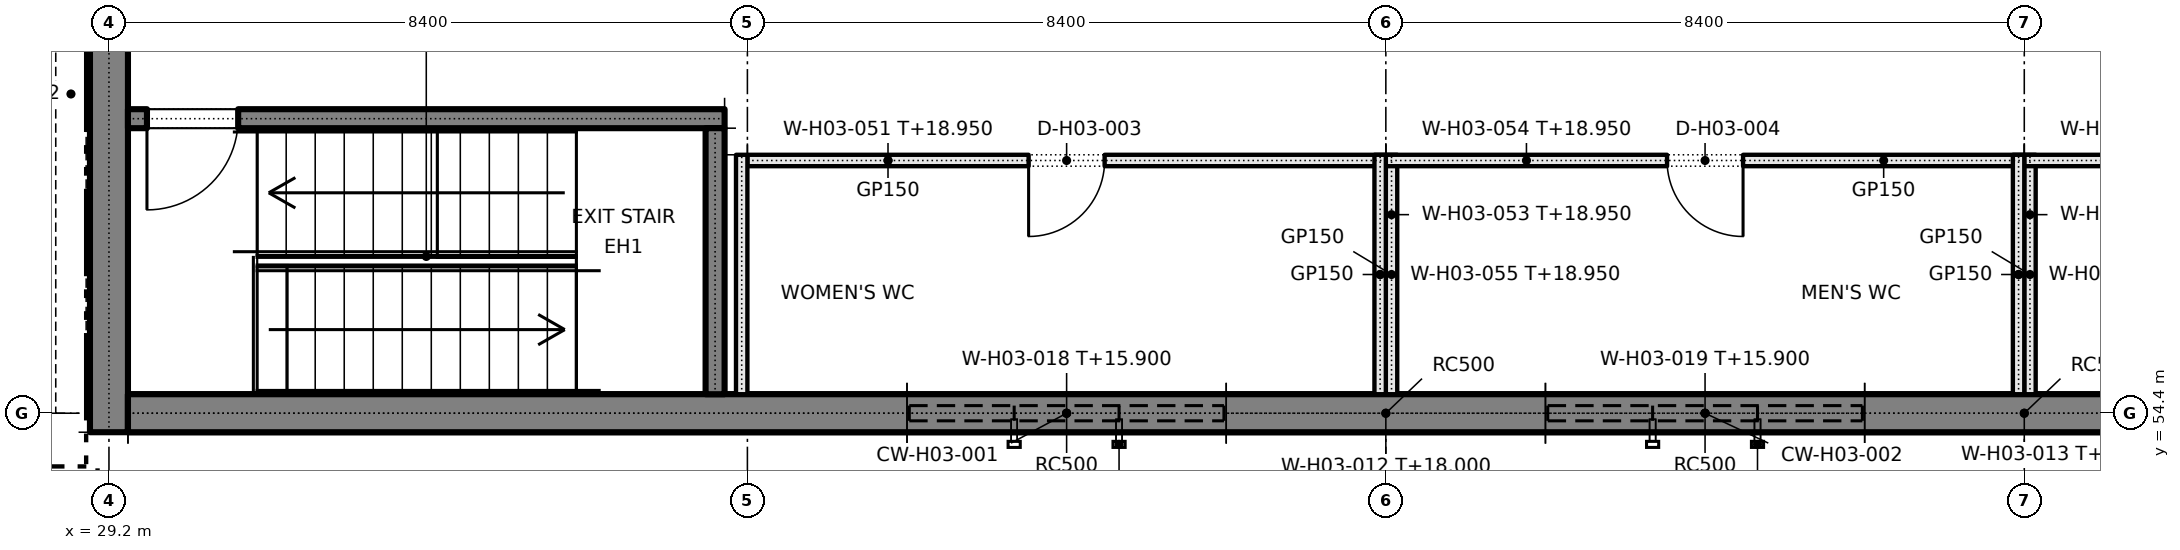
"""IFC4 building model, lengths in metres.
Left out: names, types, materials, properties, quantities, classifications, styles, units other than length and angle.
Written with IfcOpenShell. Run it as: python <this file> out.ifc"""

import sys

from ifc_helpers import new_model, si_unit, direction, frame, frame_2d, origin, place, context, subcontext, project, spatial, rectangle, extrude, element, fill, save


model = new_model("IFC4")
c1 = context("Model", 3, precision=1e-05, world=origin(), true_north=direction((0.0, 1.0)))
c2 = subcontext(c1, "Body", "Model", "MODEL_VIEW")
j1 = project(units=[si_unit("LENGTHUNIT", "METRE"), si_unit("PLANEANGLEUNIT", "RADIAN")], contexts=[c1])
p1 = place(None, origin())
s1 = spatial("IfcSite", under=j1, at=p1, CompositionType="ELEMENT")
p2 = place(p1, origin())
s2 = spatial("IfcBuilding", under=s1, at=p2, CompositionType="ELEMENT")
p3 = place(p2, frame((0.0, 0.0, 15.0)))
s3 = spatial("IfcBuildingStorey", under=s2, at=p3, CompositionType="ELEMENT", Elevation=15.0)
p4 = place(p3, frame((29.2, 54.15, 0.0), z_axis=(0.0, 0.0, 1.0), x_axis=(0.0, 1.0, 0.0)))
e1 = element("IfcWall", 1, at=p4, inside=s3, PredefinedType="SOLIDWALL", context=c2, shape_type="SweptSolid", body=[
    extrude(rectangle(XDim=42.5, YDim=0.5, at=frame_2d((21.25, 0.0))), origin(), (0.0, 0.0, 1.0), 4.2),
])
p5 = place(p3, frame((29.45, 54.4, 0.0), z_axis=(0.0, 0.0, 1.0), x_axis=(1.0, 0.0, 0.0)))
e2 = element("IfcWall", 2, at=p5, inside=s3, PredefinedType="SOLIDWALL", context=c2, shape_type="SweptSolid", body=[
    extrude(rectangle(XDim=10.25, YDim=0.5, at=frame_2d((5.125, 0.0))), origin(), (0.0, 0.0, 1.0), 3.0),
])
p6 = place(p3, frame((43.9, 54.4, 0.0), z_axis=(0.0, 0.0, 1.0), x_axis=(1.0, 0.0, 0.0)))
e3 = element("IfcWall", 3, at=p6, inside=s3, PredefinedType="SOLIDWALL", context=c2, shape_type="SweptSolid", body=[
    extrude(rectangle(XDim=4.2, YDim=0.5, at=frame_2d((2.1, 0.0))), origin(), (0.0, 0.0, 1.0), 3.0),
])
p7 = place(p3, frame((52.3, 54.4, 0.0), z_axis=(0.0, 0.0, 1.0), x_axis=(1.0, 0.0, 0.0)))
e4 = element("IfcWall", 4, at=p7, inside=s3, PredefinedType="SOLIDWALL", context=c2, shape_type="SweptSolid", body=[
    extrude(rectangle(XDim=4.2, YDim=0.5, at=frame_2d((2.1, 0.0))), origin(), (0.0, 0.0, 1.0), 3.0),
])
for number, where, z_axis, x_axis in (
    (5, (39.7, 54.4, 0.0), (0.0, 0.0, 1.0), (1.0, 0.0, 0.0)),
    (6, (48.1, 54.4, 0.0), (0.0, 0.0, 1.0), (1.0, 0.0, 0.0)),
):
    element("IfcWall", number, at=place(p3, frame(where, z_axis=z_axis, x_axis=x_axis)), inside=s3, PredefinedType="SOLIDWALL", context=c2, shape_type="SweptSolid", body=[
        extrude(rectangle(XDim=4.2, YDim=0.5, at=frame_2d((2.1, 0.0))), origin(), (0.0, 0.0, 1.0), 0.9),
    ])
p8 = place(p3, frame((29.45, 54.4, 3.0), z_axis=(0.0, 0.0, 1.0), x_axis=(1.0, 0.0, 0.0)))
e7 = element("IfcWall", 7, at=p8, inside=s3, PredefinedType="SOLIDWALL", context=c2, shape_type="SweptSolid", body=[
    extrude(rectangle(XDim=66.7, YDim=0.5, at=frame_2d((33.35, 0.0))), origin(), (0.0, 0.0, 1.0), 1.2),
])
p9 = place(p3, frame((29.45, 58.275, 0.0), z_axis=(0.0, 0.0, 1.0), x_axis=(1.0, 0.0, 0.0)))
e8 = element("IfcWall", 8, at=p9, inside=s3, PredefinedType="SOLIDWALL", context=c2, shape_type="SweptSolid", body=[
    extrude(rectangle(XDim=7.85, YDim=0.25, at=frame_2d((3.925, 0.0))), origin(), (0.0, 0.0, 1.0), 4.2),
])
p10 = place(p9, frame((0.25, 0.0, 0.0)))
e9 = element("IfcOpeningElement", 9, at=p10, cuts=e8, PredefinedType="OPENING", context=c2, shape_type="SweptSolid", body=[
    extrude(rectangle(XDim=1.2, YDim=2.1, at=frame_2d((0.6, 1.05))), frame((0.0, 0.135, 0.0), z_axis=(0.0, -1.0, 0.0), x_axis=(1.0, 0.0, 0.0)), (0.0, 0.0, 1.0), 0.27),
])
p11 = place(p3, frame((37.175, 54.65, 0.0), z_axis=(0.0, 0.0, 1.0), x_axis=(0.0, 1.0, 0.0)))
e10 = element("IfcWall", 10, at=p11, inside=s3, PredefinedType="SOLIDWALL", context=c2, shape_type="SweptSolid", body=[
    extrude(rectangle(XDim=3.5, YDim=0.25, at=frame_2d((1.75, 0.0))), origin(), (0.0, 0.0, 1.0), 4.2),
])
p12 = place(p3, frame((37.6, 57.725, 0.0), z_axis=(0.0, 0.0, 1.0), x_axis=(1.0, 0.0, 0.0)))
e11 = element("IfcWall", 11, at=p12, inside=s3, PredefinedType="PARTITIONING", context=c2, shape_type="SweptSolid", body=[
    extrude(rectangle(XDim=8.4, YDim=0.15, at=frame_2d((4.2, 0.0))), origin(), (0.0, 0.0, 1.0), 3.95),
])
p13 = place(p12, frame((3.7, 0.0, 0.0)))
e12 = element("IfcOpeningElement", 12, at=p13, cuts=e11, PredefinedType="OPENING", context=c2, shape_type="SweptSolid", body=[
    extrude(rectangle(XDim=1.0, YDim=2.1, at=frame_2d((0.5, 1.05))), frame((0.0, 0.085, 0.0), z_axis=(0.0, -1.0, 0.0), x_axis=(1.0, 0.0, 0.0)), (0.0, 0.0, 1.0), 0.17),
])
p14 = place(p3, frame((37.525, 54.65, 0.0), z_axis=(0.0, 0.0, 1.0), x_axis=(0.0, 1.0, 0.0)))
e13 = element("IfcWall", 13, at=p14, inside=s3, PredefinedType="PARTITIONING", context=c2, shape_type="SweptSolid", body=[
    extrude(rectangle(XDim=3.15, YDim=0.15, at=frame_2d((1.575, 0.0))), origin(), (0.0, 0.0, 1.0), 3.35),
])
p15 = place(p3, frame((46.075, 54.65, 0.0), z_axis=(0.0, 0.0, 1.0), x_axis=(0.0, 1.0, 0.0)))
e14 = element("IfcWall", 14, at=p15, inside=s3, PredefinedType="PARTITIONING", context=c2, shape_type="SweptSolid", body=[
    extrude(rectangle(XDim=3.15, YDim=0.15, at=frame_2d((1.575, 0.0))), origin(), (0.0, 0.0, 1.0), 3.95),
])
p16 = place(p3, frame((46.0, 57.725, 0.0), z_axis=(0.0, 0.0, 1.0), x_axis=(1.0, 0.0, 0.0)))
e15 = element("IfcWall", 15, at=p16, inside=s3, PredefinedType="PARTITIONING", context=c2, shape_type="SweptSolid", body=[
    extrude(rectangle(XDim=8.4, YDim=0.15, at=frame_2d((4.2, 0.0))), origin(), (0.0, 0.0, 1.0), 3.95),
])
p17 = place(p16, frame((3.7, 0.0, 0.0)))
e16 = element("IfcOpeningElement", 16, at=p17, cuts=e15, PredefinedType="OPENING", context=c2, shape_type="SweptSolid", body=[
    extrude(rectangle(XDim=1.0, YDim=2.1, at=frame_2d((0.5, 1.05))), frame((0.0, 0.085, 0.0), z_axis=(0.0, -1.0, 0.0), x_axis=(1.0, 0.0, 0.0)), (0.0, 0.0, 1.0), 0.17),
])
for number, where, z_axis, x_axis in (
    (17, (45.925, 54.65, 0.0), (0.0, 0.0, 1.0), (0.0, 1.0, 0.0)),
    (18, (54.475, 54.65, 0.0), (0.0, 0.0, 1.0), (0.0, 1.0, 0.0)),
):
    element("IfcWall", number, at=place(p3, frame(where, z_axis=z_axis, x_axis=x_axis)), inside=s3, PredefinedType="PARTITIONING", context=c2, shape_type="SweptSolid", body=[
        extrude(rectangle(XDim=3.15, YDim=0.15, at=frame_2d((1.575, 0.0))), origin(), (0.0, 0.0, 1.0), 3.95),
    ])
p18 = place(p3, frame((54.4, 57.725, 0.0), z_axis=(0.0, 0.0, 1.0), x_axis=(1.0, 0.0, 0.0)))
e19 = element("IfcWall", 19, at=p18, inside=s3, PredefinedType="PARTITIONING", context=c2, shape_type="SweptSolid", body=[
    extrude(rectangle(XDim=8.4, YDim=0.15, at=frame_2d((4.2, 0.0))), origin(), (0.0, 0.0, 1.0), 3.95),
])
p19 = place(p18, frame((3.7, 0.0, 0.0)))
e20 = element("IfcOpeningElement", 20, at=p19, cuts=e19, PredefinedType="OPENING", context=c2, shape_type="SweptSolid", body=[
    extrude(rectangle(XDim=1.0, YDim=2.1, at=frame_2d((0.5, 1.05))), frame((0.0, 0.085, 0.0), z_axis=(0.0, -1.0, 0.0), x_axis=(1.0, 0.0, 0.0)), (0.0, 0.0, 1.0), 0.17),
])
p20 = place(p3, frame((54.325, 54.65, 0.0), z_axis=(0.0, 0.0, 1.0), x_axis=(0.0, 1.0, 0.0)))
e21 = element("IfcWall", 21, at=p20, inside=s3, PredefinedType="PARTITIONING", context=c2, shape_type="SweptSolid", body=[
    extrude(rectangle(XDim=3.15, YDim=0.15, at=frame_2d((1.575, 0.0))), origin(), (0.0, 0.0, 1.0), 3.95),
])
p21 = place(p13, frame((1.0, 0.0, 0.0), z_axis=(0.0, 0.0, 1.0), x_axis=(-1.0, 0.0, 0.0)))
e22 = element("IfcDoor", 22, at=p21, inside=s3, OperationType="SINGLE_SWING_RIGHT", PredefinedType="DOOR", context=c2, shape_type="SweptSolid", body=[
    extrude(rectangle(XDim=1.0, YDim=2.1, at=frame_2d((0.5, 1.05))), frame((0.0, 0.025, 0.0), z_axis=(0.0, -1.0, 0.0), x_axis=(1.0, 0.0, 0.0)), (0.0, 0.0, 1.0), 0.05),
])
fill(e12, e22)
p22 = place(p17, frame((1.0, 0.0, 0.0), z_axis=(0.0, 0.0, 1.0), x_axis=(-1.0, 0.0, 0.0)))
e23 = element("IfcDoor", 23, at=p22, inside=s3, OperationType="SINGLE_SWING_LEFT", PredefinedType="DOOR", context=c2, shape_type="SweptSolid", body=[
    extrude(rectangle(XDim=1.0, YDim=2.1, at=frame_2d((0.5, 1.05))), frame((0.0, 0.025, 0.0), z_axis=(0.0, -1.0, 0.0), x_axis=(1.0, 0.0, 0.0)), (0.0, 0.0, 1.0), 0.05),
])
fill(e16, e23)
p23 = place(p10, frame((1.2, 0.0, 0.0), z_axis=(0.0, 0.0, 1.0), x_axis=(-1.0, 0.0, 0.0)))
e24 = element("IfcDoor", 24, at=p23, inside=s3, OperationType="SINGLE_SWING_RIGHT", PredefinedType="DOOR", context=c2, shape_type="SweptSolid", body=[
    extrude(rectangle(XDim=1.2, YDim=2.1, at=frame_2d((0.6, 1.05))), frame((0.0, 0.025, 0.0), z_axis=(0.0, -1.0, 0.0), x_axis=(1.0, 0.0, 0.0)), (0.0, 0.0, 1.0), 0.05),
])
fill(e9, e24)
save(model, sys.argv[1])
